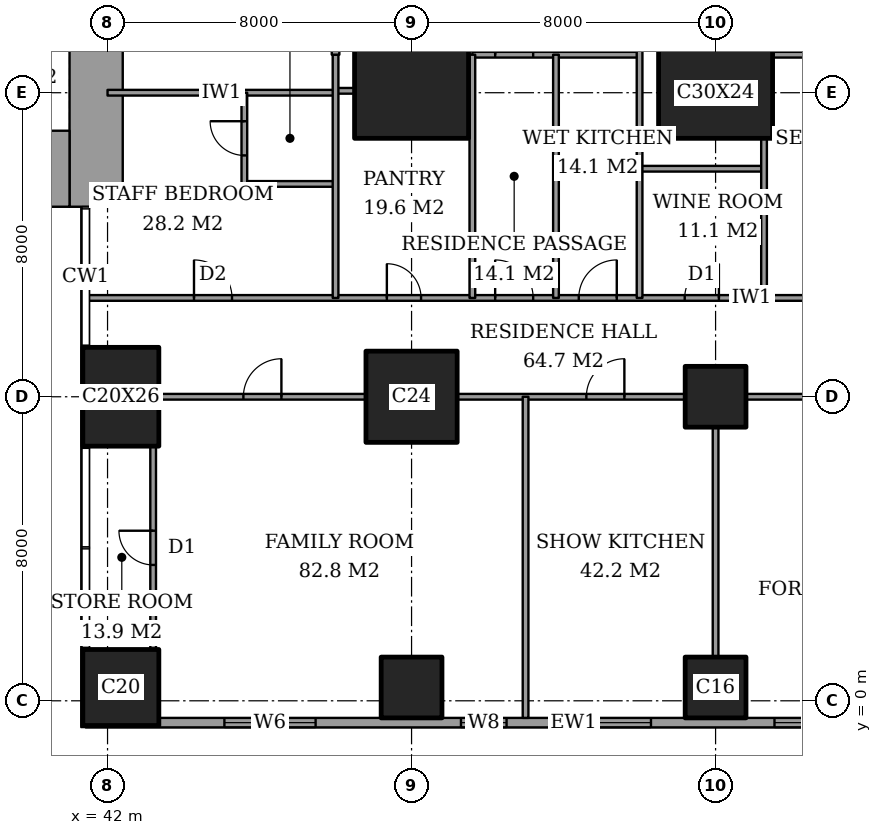
"""IFC4 building model, lengths in metres.
Left out: names, types, materials, properties, quantities, classifications, styles, units other than length and angle.
Written with IfcOpenShell. Run it as: python <this file> out.ifc"""

import sys

from ifc_helpers import new_model, si_unit, direction, frame, frame_2d, origin, origin_2d, place, context, subcontext, project, spatial, rectangle, extrude, element, fill, save


model = new_model("IFC4")
c1 = context("Model", 3, precision=1e-05, world=origin(), true_north=direction((0.0, 1.0)))
c2 = subcontext(c1, "Body", "Model", "MODEL_VIEW")
j1 = project(units=[si_unit("LENGTHUNIT", "METRE"), si_unit("PLANEANGLEUNIT", "RADIAN")], contexts=[c1])
p1 = place(None, origin())
s1 = spatial("IfcSite", under=j1, at=p1, CompositionType="ELEMENT")
p2 = place(p1, origin())
s2 = spatial("IfcBuilding", under=s1, at=p2, CompositionType="ELEMENT")
p3 = place(p2, frame((0.0, 0.0, 270.0)))
s3 = spatial("IfcBuildingStorey", under=s2, at=p3, CompositionType="ELEMENT", Elevation=270.0)
p4 = place(p3, frame((42.35, 0.35, 0.0), z_axis=(0.0, 0.0, 1.0), x_axis=(1.0, 0.0, 0.0)))
e1 = element("IfcColumn", 1, at=p4, inside=s3, PredefinedType="COLUMN", context=c2, shape_type="SweptSolid", body=[
    extrude(rectangle(XDim=2.0, YDim=2.0, at=origin_2d()), origin(), (0.0, 0.0, 1.0), 3.6),
])
p5 = place(p3, frame((42.35, 8.0, 0.0), z_axis=(0.0, 0.0, 1.0), x_axis=(1.0, 0.0, 0.0)))
e2 = element("IfcColumn", 2, at=p5, inside=s3, PredefinedType="COLUMN", context=c2, shape_type="SweptSolid", body=[
    extrude(rectangle(XDim=2.0, YDim=2.6, at=origin_2d()), origin(), (0.0, 0.0, 1.0), 3.6),
])
p6 = place(p3, frame((50.0, 0.35, 0.0), z_axis=(0.0, 0.0, 1.0), x_axis=(1.0, 0.0, 0.0)))
e3 = element("IfcColumn", 3, at=p6, inside=s3, PredefinedType="COLUMN", context=c2, shape_type="SweptSolid", body=[
    extrude(rectangle(XDim=1.6, YDim=1.6, at=origin_2d()), origin(), (0.0, 0.0, 1.0), 3.6),
])
p7 = place(p3, frame((50.0, 8.0, 0.0), z_axis=(0.0, 0.0, 1.0), x_axis=(1.0, 0.0, 0.0)))
e4 = element("IfcColumn", 4, at=p7, inside=s3, PredefinedType="COLUMN", context=c2, shape_type="SweptSolid", body=[
    extrude(rectangle(XDim=2.4, YDim=2.4, at=origin_2d()), origin(), (0.0, 0.0, 1.0), 3.6),
])
p8 = place(p3, frame((50.0, 16.0, 0.0), z_axis=(0.0, 0.0, 1.0), x_axis=(1.0, 0.0, 0.0)))
e5 = element("IfcColumn", 5, at=p8, inside=s3, PredefinedType="COLUMN", context=c2, shape_type="SweptSolid", body=[
    extrude(rectangle(XDim=3.0, YDim=2.4, at=origin_2d()), origin(), (0.0, 0.0, 1.0), 3.6),
])
for number, where, z_axis, x_axis in (
    (6, (58.0, 0.35, 0.0), (0.0, 0.0, 1.0), (1.0, 0.0, 0.0)),
    (7, (58.0, 8.0, 0.0), (0.0, 0.0, 1.0), (1.0, 0.0, 0.0)),
):
    element("IfcColumn", number, at=place(p3, frame(where, z_axis=z_axis, x_axis=x_axis)), inside=s3, PredefinedType="COLUMN", context=c2, shape_type="SweptSolid", body=[
        extrude(rectangle(XDim=1.6, YDim=1.6, at=origin_2d()), origin(), (0.0, 0.0, 1.0), 3.6),
    ])
p9 = place(p3, frame((58.0, 16.0, 0.0), z_axis=(0.0, 0.0, 1.0), x_axis=(1.0, 0.0, 0.0)))
e8 = element("IfcColumn", 8, at=p9, inside=s3, PredefinedType="COLUMN", context=c2, shape_type="SweptSolid", body=[
    extrude(rectangle(XDim=3.0, YDim=2.4, at=origin_2d()), origin(), (0.0, 0.0, 1.0), 3.6),
])
p10 = place(p3, frame((37.85, 14.0, 0.0), z_axis=(0.0, 0.0, 1.0), x_axis=(1.0, 0.0, 0.0)))
e9 = element("IfcWall", 9, at=p10, inside=s3, PredefinedType="SHEAR", context=c2, shape_type="SweptSolid", body=[
    extrude(rectangle(XDim=3.15, YDim=2.0, at=frame_2d((1.575, 0.0))), origin(), (0.0, 0.0, 1.0), 3.6),
])
p11 = place(p3, frame((41.7, 13.0, 0.0), z_axis=(0.0, 0.0, 1.0), x_axis=(0.0, 1.0, 0.0)))
e10 = element("IfcWall", 10, at=p11, inside=s3, PredefinedType="SHEAR", context=c2, shape_type="SweptSolid", body=[
    extrude(rectangle(XDim=11.85, YDim=1.4, at=frame_2d((5.925, 0.0))), origin(), (0.0, 0.0, 1.0), 3.6),
])
p12 = place(p11, frame((7.5, 0.0, 0.0)))
e11 = element("IfcOpeningElement", 11, at=p12, cuts=e10, PredefinedType="OPENING", context=c2, shape_type="SweptSolid", body=[
    extrude(rectangle(XDim=1.8, YDim=2.4, at=frame_2d((0.9, 1.2))), frame((0.0, 0.71, 0.0), z_axis=(0.0, -1.0, 0.0), x_axis=(1.0, 0.0, 0.0)), (0.0, 0.0, 1.0), 1.42),
])
p13 = place(p3, frame((41.425, -0.575, 0.0), z_axis=(0.0, 0.0, 1.0), x_axis=(1.0, 0.0, 0.0)))
e12 = element("IfcWall", 12, at=p13, inside=s3, PredefinedType="SOLIDWALL", context=c2, shape_type="SweptSolid", body=[
    extrude(rectangle(XDim=21.4, YDim=0.25, at=frame_2d((10.7, 0.0))), origin(), (0.0, 0.0, 1.0), 3.6),
])
p14 = place(p13, frame((3.65, 0.0, 0.6)))
e13 = element("IfcOpeningElement", 13, at=p14, cuts=e12, PredefinedType="OPENING", context=c2, shape_type="SweptSolid", body=[
    extrude(rectangle(XDim=2.4, YDim=2.0, at=frame_2d((1.2, 1.0))), frame((0.0, 0.135, 0.0), z_axis=(0.0, -1.0, 0.0), x_axis=(1.0, 0.0, 0.0)), (0.0, 0.0, 1.0), 0.27),
])
p15 = place(p13, frame((9.875, 0.0, 0.6)))
e14 = element("IfcOpeningElement", 14, at=p15, cuts=e12, PredefinedType="OPENING", context=c2, shape_type="SweptSolid", body=[
    extrude(rectangle(XDim=1.2, YDim=2.0, at=frame_2d((0.6, 1.0))), frame((0.0, 0.135, 0.0), z_axis=(0.0, -1.0, 0.0), x_axis=(1.0, 0.0, 0.0)), (0.0, 0.0, 1.0), 0.27),
])
p16 = place(p13, frame((12.475, 0.0, 0.6)))
e15 = element("IfcOpeningElement", 15, at=p16, cuts=e12, PredefinedType="OPENING", context=c2, shape_type="SweptSolid", body=[
    extrude(rectangle(XDim=2.4, YDim=2.0, at=frame_2d((1.2, 1.0))), frame((0.0, 0.135, 0.0), z_axis=(0.0, -1.0, 0.0), x_axis=(1.0, 0.0, 0.0)), (0.0, 0.0, 1.0), 0.27),
])
p17 = place(p13, frame((18.125, 0.0, 0.6)))
e16 = element("IfcOpeningElement", 16, at=p17, cuts=e12, PredefinedType="OPENING", context=c2, shape_type="SweptSolid", body=[
    extrude(rectangle(XDim=2.4, YDim=2.0, at=frame_2d((1.2, 1.0))), frame((0.0, 0.135, 0.0), z_axis=(0.0, -1.0, 0.0), x_axis=(1.0, 0.0, 0.0)), (0.0, 0.0, 1.0), 0.27),
])
p18 = place(p3, frame((43.35, 8.0, 0.0), z_axis=(0.0, 0.0, 1.0), x_axis=(1.0, 0.0, 0.0)))
e17 = element("IfcWall", 17, at=p18, inside=s3, PredefinedType="PARTITIONING", context=c2, shape_type="SweptSolid", body=[
    extrude(rectangle(XDim=5.45, YDim=0.15, at=frame_2d((2.725, 0.0))), origin(), (0.0, 0.0, 1.0), 3.35),
])
p19 = place(p18, frame((2.225, 0.0, 0.0)))
e18 = element("IfcOpeningElement", 18, at=p19, cuts=e17, PredefinedType="OPENING", context=c2, shape_type="SweptSolid", body=[
    extrude(rectangle(XDim=1.0, YDim=2.1, at=frame_2d((0.5, 1.05))), frame((0.0, 0.085, 0.0), z_axis=(0.0, -1.0, 0.0), x_axis=(1.0, 0.0, 0.0)), (0.0, 0.0, 1.0), 0.17),
])
p20 = place(p3, frame((51.2, 8.0, 0.0), z_axis=(0.0, 0.0, 1.0), x_axis=(1.0, 0.0, 0.0)))
e19 = element("IfcWall", 19, at=p20, inside=s3, PredefinedType="PARTITIONING", context=c2, shape_type="SweptSolid", body=[
    extrude(rectangle(XDim=6.0, YDim=0.15, at=frame_2d((3.0, 0.0))), origin(), (0.0, 0.0, 1.0), 3.35),
])
p21 = place(p20, frame((3.4, 0.0, 0.0)))
e20 = element("IfcOpeningElement", 20, at=p21, cuts=e19, PredefinedType="OPENING", context=c2, shape_type="SweptSolid", body=[
    extrude(rectangle(XDim=1.0, YDim=2.1, at=frame_2d((0.5, 1.05))), frame((0.0, 0.085, 0.0), z_axis=(0.0, -1.0, 0.0), x_axis=(1.0, 0.0, 0.0)), (0.0, 0.0, 1.0), 0.17),
])
p22 = place(p3, frame((58.8, 8.0, 0.0), z_axis=(0.0, 0.0, 1.0), x_axis=(1.0, 0.0, 0.0)))
e21 = element("IfcWall", 21, at=p22, inside=s3, PredefinedType="PARTITIONING", context=c2, shape_type="SweptSolid", body=[
    extrude(rectangle(XDim=6.05, YDim=0.15, at=frame_2d((3.025, 0.0))), origin(), (0.0, 0.0, 1.0), 3.35),
])
p23 = place(p22, frame((2.525, 0.0, 0.0)))
e22 = element("IfcOpeningElement", 22, at=p23, cuts=e21, PredefinedType="OPENING", context=c2, shape_type="SweptSolid", body=[
    extrude(rectangle(XDim=1.0, YDim=2.1, at=frame_2d((0.5, 1.05))), frame((0.0, 0.085, 0.0), z_axis=(0.0, -1.0, 0.0), x_axis=(1.0, 0.0, 0.0)), (0.0, 0.0, 1.0), 0.17),
])
p24 = place(p3, frame((41.439, 10.6, 0.0), z_axis=(0.0, 0.0, 1.0), x_axis=(1.0, 0.0, 0.0)))
e23 = element("IfcWall", 23, at=p24, inside=s3, PredefinedType="PARTITIONING", context=c2, shape_type="SweptSolid", body=[
    extrude(rectangle(XDim=25.011, YDim=0.15, at=frame_2d((12.505, 0.0))), origin(), (0.0, 0.0, 1.0), 3.35),
])
p25 = place(p24, frame((10.761, 0.0, 0.0)))
e24 = element("IfcOpeningElement", 24, at=p25, cuts=e23, PredefinedType="OPENING", context=c2, shape_type="SweptSolid", body=[
    extrude(rectangle(XDim=1.0, YDim=2.1, at=frame_2d((0.5, 1.05))), frame((0.0, 0.085, 0.0), z_axis=(0.0, -1.0, 0.0), x_axis=(1.0, 0.0, 0.0)), (0.0, 0.0, 1.0), 0.17),
])
p26 = place(p24, frame((20.924, 0.0, 0.0)))
e25 = element("IfcOpeningElement", 25, at=p26, cuts=e23, PredefinedType="OPENING", context=c2, shape_type="SweptSolid", body=[
    extrude(rectangle(XDim=1.0, YDim=2.1, at=frame_2d((0.5, 1.05))), frame((0.0, 0.085, 0.0), z_axis=(0.0, -1.0, 0.0), x_axis=(1.0, 0.0, 0.0)), (0.0, 0.0, 1.0), 0.17),
])
p27 = place(p24, frame((15.749, 0.0, 0.0)))
e26 = element("IfcOpeningElement", 26, at=p27, cuts=e23, PredefinedType="OPENING", context=c2, shape_type="SweptSolid", body=[
    extrude(rectangle(XDim=0.9, YDim=2.1, at=frame_2d((0.45, 1.05))), frame((0.0, 0.085, 0.0), z_axis=(0.0, -1.0, 0.0), x_axis=(1.0, 0.0, 0.0)), (0.0, 0.0, 1.0), 0.17),
])
p28 = place(p24, frame((12.961, 0.0, 0.0)))
e27 = element("IfcOpeningElement", 27, at=p28, cuts=e23, PredefinedType="OPENING", context=c2, shape_type="SweptSolid", body=[
    extrude(rectangle(XDim=1.0, YDim=2.1, at=frame_2d((0.5, 1.05))), frame((0.0, 0.085, 0.0), z_axis=(0.0, -1.0, 0.0), x_axis=(1.0, 0.0, 0.0)), (0.0, 0.0, 1.0), 0.17),
])
p29 = place(p24, frame((7.911, 0.0, 0.0)))
e28 = element("IfcOpeningElement", 28, at=p29, cuts=e23, PredefinedType="OPENING", context=c2, shape_type="SweptSolid", body=[
    extrude(rectangle(XDim=0.9, YDim=2.1, at=frame_2d((0.45, 1.05))), frame((0.0, 0.085, 0.0), z_axis=(0.0, -1.0, 0.0), x_axis=(1.0, 0.0, 0.0)), (0.0, 0.0, 1.0), 0.17),
])
p30 = place(p24, frame((2.836, 0.0, 0.0)))
e29 = element("IfcOpeningElement", 29, at=p30, cuts=e23, PredefinedType="OPENING", context=c2, shape_type="SweptSolid", body=[
    extrude(rectangle(XDim=1.0, YDim=2.1, at=frame_2d((0.5, 1.05))), frame((0.0, 0.085, 0.0), z_axis=(0.0, -1.0, 0.0), x_axis=(1.0, 0.0, 0.0)), (0.0, 0.0, 1.0), 0.17),
])
p31 = place(p3, frame((45.6, 13.6, 0.0), z_axis=(0.0, 0.0, 1.0), x_axis=(1.0, 0.0, 0.0)))
e30 = element("IfcWall", 30, at=p31, inside=s3, PredefinedType="PARTITIONING", context=c2, shape_type="SweptSolid", body=[
    extrude(rectangle(XDim=2.4, YDim=0.15, at=frame_2d((1.2, 0.0))), origin(), (0.0, 0.0, 1.0), 3.35),
])
p32 = place(p3, frame((56.0, 14.0, 0.0), z_axis=(0.0, 0.0, 1.0), x_axis=(1.0, 0.0, 0.0)))
e31 = element("IfcWall", 31, at=p32, inside=s3, PredefinedType="PARTITIONING", context=c2, shape_type="SweptSolid", body=[
    extrude(rectangle(XDim=3.275, YDim=0.15, at=frame_2d((1.637, 0.0))), origin(), (0.0, 0.0, 1.0), 3.35),
])
p33 = place(p3, frame((42.0, 16.0, 0.0), z_axis=(0.0, 0.0, 1.0), x_axis=(1.0, 0.0, 0.0)))
e32 = element("IfcWall", 32, at=p33, inside=s3, PredefinedType="PARTITIONING", context=c2, shape_type="SweptSolid", body=[
    extrude(rectangle(XDim=6.0, YDim=0.15, at=frame_2d((3.0, 0.0))), origin(), (0.0, 0.0, 1.0), 2.634),
])
p34 = place(p3, frame((48.0, 16.05, 0.0), z_axis=(0.0, 0.0, 1.0), x_axis=(1.0, 0.0, 0.0)))
e33 = element("IfcWall", 33, at=p34, inside=s3, PredefinedType="PARTITIONING", context=c2, shape_type="SweptSolid", body=[
    extrude(rectangle(XDim=0.5, YDim=0.15, at=frame_2d((0.25, 0.0))), origin(), (0.0, 0.0, 1.0), 2.634),
])
p35 = place(p3, frame((51.6, 17.0, 0.0), z_axis=(0.0, 0.0, 1.0), x_axis=(1.0, 0.0, 0.0)))
e34 = element("IfcWall", 34, at=p35, inside=s3, PredefinedType="PARTITIONING", context=c2, shape_type="SweptSolid", body=[
    extrude(rectangle(XDim=4.4, YDim=0.15, at=frame_2d((2.2, 0.0))), origin(), (0.0, 0.0, 1.0), 3.35),
])
p36 = place(p35, frame((0.6, 0.0, 0.0)))
e35 = element("IfcOpeningElement", 35, at=p36, cuts=e34, PredefinedType="OPENING", context=c2, shape_type="SweptSolid", body=[
    extrude(rectangle(XDim=1.0, YDim=2.1, at=frame_2d((0.5, 1.05))), frame((0.0, 0.085, 0.0), z_axis=(0.0, -1.0, 0.0), x_axis=(1.0, 0.0, 0.0)), (0.0, 0.0, 1.0), 0.17),
])
p37 = place(p3, frame((59.5, 17.0, 0.0), z_axis=(0.0, 0.0, 1.0), x_axis=(1.0, 0.0, 0.0)))
e36 = element("IfcWall", 36, at=p37, inside=s3, PredefinedType="PARTITIONING", context=c2, shape_type="SweptSolid", body=[
    extrude(rectangle(XDim=6.95, YDim=0.15, at=frame_2d((3.475, 0.0))), origin(), (0.0, 0.0, 1.0), 3.35),
])
p38 = place(p3, frame((43.2, 1.35, 0.0), z_axis=(0.0, 0.0, 1.0), x_axis=(0.0, 1.0, 0.0)))
e37 = element("IfcWall", 37, at=p38, inside=s3, PredefinedType="PARTITIONING", context=c2, shape_type="SweptSolid", body=[
    extrude(rectangle(XDim=5.35, YDim=0.15, at=frame_2d((2.675, 0.0))), origin(), (0.0, 0.0, 1.0), 3.35),
])
p39 = place(p38, frame((2.225, 0.0, 0.0)))
e38 = element("IfcOpeningElement", 38, at=p39, cuts=e37, PredefinedType="OPENING", context=c2, shape_type="SweptSolid", body=[
    extrude(rectangle(XDim=0.9, YDim=2.1, at=frame_2d((0.45, 1.05))), frame((0.0, 0.085, 0.0), z_axis=(0.0, -1.0, 0.0), x_axis=(1.0, 0.0, 0.0)), (0.0, 0.0, 1.0), 0.17),
])
p40 = place(p3, frame((45.6, 13.6, 0.0), z_axis=(0.0, 0.0, 1.0), x_axis=(0.0, 1.0, 0.0)))
e39 = element("IfcWall", 39, at=p40, inside=s3, PredefinedType="PARTITIONING", context=c2, shape_type="SweptSolid", body=[
    extrude(rectangle(XDim=2.4, YDim=0.15, at=frame_2d((1.2, 0.0))), origin(), (0.0, 0.0, 1.0), 3.35),
])
p41 = place(p40, frame((0.75, 0.0, 0.0)))
e40 = element("IfcOpeningElement", 40, at=p41, cuts=e39, PredefinedType="OPENING", context=c2, shape_type="SweptSolid", body=[
    extrude(rectangle(XDim=0.9, YDim=2.1, at=frame_2d((0.45, 1.05))), frame((0.0, 0.085, 0.0), z_axis=(0.0, -1.0, 0.0), x_axis=(1.0, 0.0, 0.0)), (0.0, 0.0, 1.0), 0.17),
])
p42 = place(p3, frame((48.0, 17.0, 0.0), z_axis=(0.0, 0.0, 1.0), x_axis=(0.0, 1.0, 0.0)))
e41 = element("IfcWall", 41, at=p42, inside=s3, PredefinedType="PARTITIONING", context=c2, shape_type="SweptSolid", body=[
    extrude(rectangle(XDim=7.0, YDim=0.2, at=frame_2d((3.5, 0.0))), origin(), (0.0, 0.0, 1.0), 3.35),
])
p43 = place(p42, frame((4.4, 0.0, 0.0)))
e42 = element("IfcOpeningElement", 42, at=p43, cuts=e41, PredefinedType="OPENING", context=c2, shape_type="SweptSolid", body=[
    extrude(rectangle(XDim=1.2, YDim=2.4, at=frame_2d((0.6, 1.2))), frame((0.0, 0.11, 0.0), z_axis=(0.0, -1.0, 0.0), x_axis=(1.0, 0.0, 0.0)), (0.0, 0.0, 1.0), 0.22),
])
p44 = place(p42, frame((1.05, 0.0, 0.0)))
e43 = element("IfcOpeningElement", 43, at=p44, cuts=e41, PredefinedType="OPENING", context=c2, shape_type="SweptSolid", body=[
    extrude(rectangle(XDim=0.9, YDim=2.1, at=frame_2d((0.45, 1.05))), frame((0.0, 0.11, 0.0), z_axis=(0.0, -1.0, 0.0), x_axis=(1.0, 0.0, 0.0)), (0.0, 0.0, 1.0), 0.22),
])
for number, where, z_axis, x_axis in (
    (44, (48.0, 10.6, 0.0), (0.0, 0.0, 1.0), (0.0, 1.0, 0.0)),
    (45, (51.6, 10.6, 0.0), (0.0, 0.0, 1.0), (0.0, 1.0, 0.0)),
):
    element("IfcWall", number, at=place(p3, frame(where, z_axis=z_axis, x_axis=x_axis)), inside=s3, PredefinedType="PARTITIONING", context=c2, shape_type="SweptSolid", body=[
        extrude(rectangle(XDim=6.4, YDim=0.15, at=frame_2d((3.2, 0.0))), origin(), (0.0, 0.0, 1.0), 3.35),
    ])
p45 = place(p3, frame((53.0, -0.45, 0.0), z_axis=(0.0, 0.0, 1.0), x_axis=(0.0, 1.0, 0.0)))
e46 = element("IfcWall", 46, at=p45, inside=s3, PredefinedType="PARTITIONING", context=c2, shape_type="SweptSolid", body=[
    extrude(rectangle(XDim=8.45, YDim=0.15, at=frame_2d((4.225, 0.0))), origin(), (0.0, 0.0, 1.0), 3.35),
])
p46 = place(p3, frame((53.8, 10.6, 0.0), z_axis=(0.0, 0.0, 1.0), x_axis=(0.0, 1.0, 0.0)))
e47 = element("IfcWall", 47, at=p46, inside=s3, PredefinedType="PARTITIONING", context=c2, shape_type="SweptSolid", body=[
    extrude(rectangle(XDim=6.4, YDim=0.15, at=frame_2d((3.2, 0.0))), origin(), (0.0, 0.0, 1.0), 3.35),
])
p47 = place(p3, frame((56.0, 10.6, 0.0), z_axis=(0.0, 0.0, 1.0), x_axis=(0.0, 1.0, 0.0)))
e48 = element("IfcWall", 48, at=p47, inside=s3, PredefinedType="PARTITIONING", context=c2, shape_type="SweptSolid", body=[
    extrude(rectangle(XDim=11.0, YDim=0.15, at=frame_2d((5.5, 0.0))), origin(), (0.0, 0.0, 1.0), 3.35),
])
p48 = place(p47, frame((8.2, 0.0, 0.0)))
e49 = element("IfcOpeningElement", 49, at=p48, cuts=e48, PredefinedType="OPENING", context=c2, shape_type="SweptSolid", body=[
    extrude(rectangle(XDim=1.0, YDim=2.1, at=frame_2d((0.5, 1.05))), frame((0.0, 0.085, 0.0), z_axis=(0.0, -1.0, 0.0), x_axis=(1.0, 0.0, 0.0)), (0.0, 0.0, 1.0), 0.17),
])
p49 = place(p3, frame((58.0, 1.15, 0.0), z_axis=(0.0, 0.0, 1.0), x_axis=(0.0, 1.0, 0.0)))
e50 = element("IfcWall", 50, at=p49, inside=s3, PredefinedType="PARTITIONING", context=c2, shape_type="SweptSolid", body=[
    extrude(rectangle(XDim=6.05, YDim=0.15, at=frame_2d((3.025, 0.0))), origin(), (0.0, 0.0, 1.0), 3.35),
])
p50 = place(p3, frame((59.275, 10.6, 0.0), z_axis=(0.0, 0.0, 1.0), x_axis=(0.0, 1.0, 0.0)))
e51 = element("IfcWall", 51, at=p50, inside=s3, PredefinedType="PARTITIONING", context=c2, shape_type="SweptSolid", body=[
    extrude(rectangle(XDim=4.2, YDim=0.15, at=frame_2d((2.1, 0.0))), origin(), (0.0, 0.0, 1.0), 3.35),
])
p51 = place(p14, origin())
e52 = element("IfcWindow", 52, at=p51, inside=s3, PartitioningType="SINGLE_PANEL", PredefinedType="WINDOW", context=c2, shape_type="SweptSolid", body=[
    extrude(rectangle(XDim=2.4, YDim=2.0, at=frame_2d((1.2, 1.0))), frame((0.0, 0.03, 0.0), z_axis=(0.0, -1.0, 0.0), x_axis=(1.0, 0.0, 0.0)), (0.0, 0.0, 1.0), 0.06),
])
fill(e13, e52)
p52 = place(p15, origin())
e53 = element("IfcWindow", 53, at=p52, inside=s3, PartitioningType="SINGLE_PANEL", PredefinedType="WINDOW", context=c2, shape_type="SweptSolid", body=[
    extrude(rectangle(XDim=1.2, YDim=2.0, at=frame_2d((0.6, 1.0))), frame((0.0, 0.03, 0.0), z_axis=(0.0, -1.0, 0.0), x_axis=(1.0, 0.0, 0.0)), (0.0, 0.0, 1.0), 0.06),
])
fill(e14, e53)
p53 = place(p16, origin())
e54 = element("IfcWindow", 54, at=p53, inside=s3, PartitioningType="SINGLE_PANEL", PredefinedType="WINDOW", context=c2, shape_type="SweptSolid", body=[
    extrude(rectangle(XDim=2.4, YDim=2.0, at=frame_2d((1.2, 1.0))), frame((0.0, 0.03, 0.0), z_axis=(0.0, -1.0, 0.0), x_axis=(1.0, 0.0, 0.0)), (0.0, 0.0, 1.0), 0.06),
])
fill(e15, e54)
p54 = place(p17, origin())
e55 = element("IfcWindow", 55, at=p54, inside=s3, PartitioningType="SINGLE_PANEL", PredefinedType="WINDOW", context=c2, shape_type="SweptSolid", body=[
    extrude(rectangle(XDim=2.4, YDim=2.0, at=frame_2d((1.2, 1.0))), frame((0.0, 0.03, 0.0), z_axis=(0.0, -1.0, 0.0), x_axis=(1.0, 0.0, 0.0)), (0.0, 0.0, 1.0), 0.06),
])
fill(e16, e55)
p55 = place(p21, origin())
e56 = element("IfcDoor", 56, at=p55, inside=s3, OperationType="SINGLE_SWING_LEFT", PredefinedType="DOOR", context=c2, shape_type="SweptSolid", body=[
    extrude(rectangle(XDim=1.0, YDim=2.1, at=frame_2d((0.5, 1.05))), frame((0.0, 0.025, 0.0), z_axis=(0.0, -1.0, 0.0), x_axis=(1.0, 0.0, 0.0)), (0.0, 0.0, 1.0), 0.05),
])
fill(e20, e56)
p56 = place(p19, origin())
e57 = element("IfcDoor", 57, at=p56, inside=s3, OperationType="SINGLE_SWING_LEFT", PredefinedType="DOOR", context=c2, shape_type="SweptSolid", body=[
    extrude(rectangle(XDim=1.0, YDim=2.1, at=frame_2d((0.5, 1.05))), frame((0.0, 0.025, 0.0), z_axis=(0.0, -1.0, 0.0), x_axis=(1.0, 0.0, 0.0)), (0.0, 0.0, 1.0), 0.05),
])
fill(e18, e57)
p57 = place(p39, origin())
e58 = element("IfcDoor", 58, at=p57, inside=s3, OperationType="SINGLE_SWING_LEFT", PredefinedType="DOOR", context=c2, shape_type="SweptSolid", body=[
    extrude(rectangle(XDim=0.9, YDim=2.1, at=frame_2d((0.45, 1.05))), frame((0.0, 0.025, 0.0), z_axis=(0.0, -1.0, 0.0), x_axis=(1.0, 0.0, 0.0)), (0.0, 0.0, 1.0), 0.05),
])
fill(e38, e58)
p58 = place(p25, origin())
e59 = element("IfcDoor", 59, at=p58, inside=s3, OperationType="SINGLE_SWING_RIGHT", PredefinedType="DOOR", context=c2, shape_type="SweptSolid", body=[
    extrude(rectangle(XDim=1.0, YDim=2.1, at=frame_2d((0.5, 1.05))), frame((0.0, 0.025, 0.0), z_axis=(0.0, -1.0, 0.0), x_axis=(1.0, 0.0, 0.0)), (0.0, 0.0, 1.0), 0.05),
])
fill(e24, e59)
p59 = place(p27, origin())
e60 = element("IfcDoor", 60, at=p59, inside=s3, OperationType="SINGLE_SWING_LEFT", PredefinedType="DOOR", context=c2, shape_type="SweptSolid", body=[
    extrude(rectangle(XDim=0.9, YDim=2.1, at=frame_2d((0.45, 1.05))), frame((0.0, 0.025, 0.0), z_axis=(0.0, -1.0, 0.0), x_axis=(1.0, 0.0, 0.0)), (0.0, 0.0, 1.0), 0.05),
])
fill(e26, e60)
p60 = place(p28, origin())
e61 = element("IfcDoor", 61, at=p60, inside=s3, OperationType="SINGLE_SWING_LEFT", PredefinedType="DOOR", context=c2, shape_type="SweptSolid", body=[
    extrude(rectangle(XDim=1.0, YDim=2.1, at=frame_2d((0.5, 1.05))), frame((0.0, 0.025, 0.0), z_axis=(0.0, -1.0, 0.0), x_axis=(1.0, 0.0, 0.0)), (0.0, 0.0, 1.0), 0.05),
])
fill(e27, e61)
p61 = place(p36, origin())
e62 = element("IfcDoor", 62, at=p61, inside=s3, OperationType="SINGLE_SWING_RIGHT", PredefinedType="DOOR", context=c2, shape_type="SweptSolid", body=[
    extrude(rectangle(XDim=1.0, YDim=2.1, at=frame_2d((0.5, 1.05))), frame((0.0, 0.025, 0.0), z_axis=(0.0, -1.0, 0.0), x_axis=(1.0, 0.0, 0.0)), (0.0, 0.0, 1.0), 0.05),
])
fill(e35, e62)
p62 = place(p29, origin())
e63 = element("IfcDoor", 63, at=p62, inside=s3, OperationType="SINGLE_SWING_RIGHT", PredefinedType="DOOR", context=c2, shape_type="SweptSolid", body=[
    extrude(rectangle(XDim=0.9, YDim=2.1, at=frame_2d((0.45, 1.05))), frame((0.0, 0.025, 0.0), z_axis=(0.0, -1.0, 0.0), x_axis=(1.0, 0.0, 0.0)), (0.0, 0.0, 1.0), 0.05),
])
fill(e28, e63)
p63 = place(p41, origin())
e64 = element("IfcDoor", 64, at=p63, inside=s3, OperationType="SINGLE_SWING_LEFT", PredefinedType="DOOR", context=c2, shape_type="SweptSolid", body=[
    extrude(rectangle(XDim=0.9, YDim=2.1, at=frame_2d((0.45, 1.05))), frame((0.0, 0.025, 0.0), z_axis=(0.0, -1.0, 0.0), x_axis=(1.0, 0.0, 0.0)), (0.0, 0.0, 1.0), 0.05),
])
fill(e40, e64)
p64 = place(p30, origin())
e65 = element("IfcDoor", 65, at=p64, inside=s3, OperationType="SINGLE_SWING_RIGHT", PredefinedType="DOOR", context=c2, shape_type="SweptSolid", body=[
    extrude(rectangle(XDim=1.0, YDim=2.1, at=frame_2d((0.5, 1.05))), frame((0.0, 0.025, 0.0), z_axis=(0.0, -1.0, 0.0), x_axis=(1.0, 0.0, 0.0)), (0.0, 0.0, 1.0), 0.05),
])
fill(e29, e65)
save(model, sys.argv[1])
